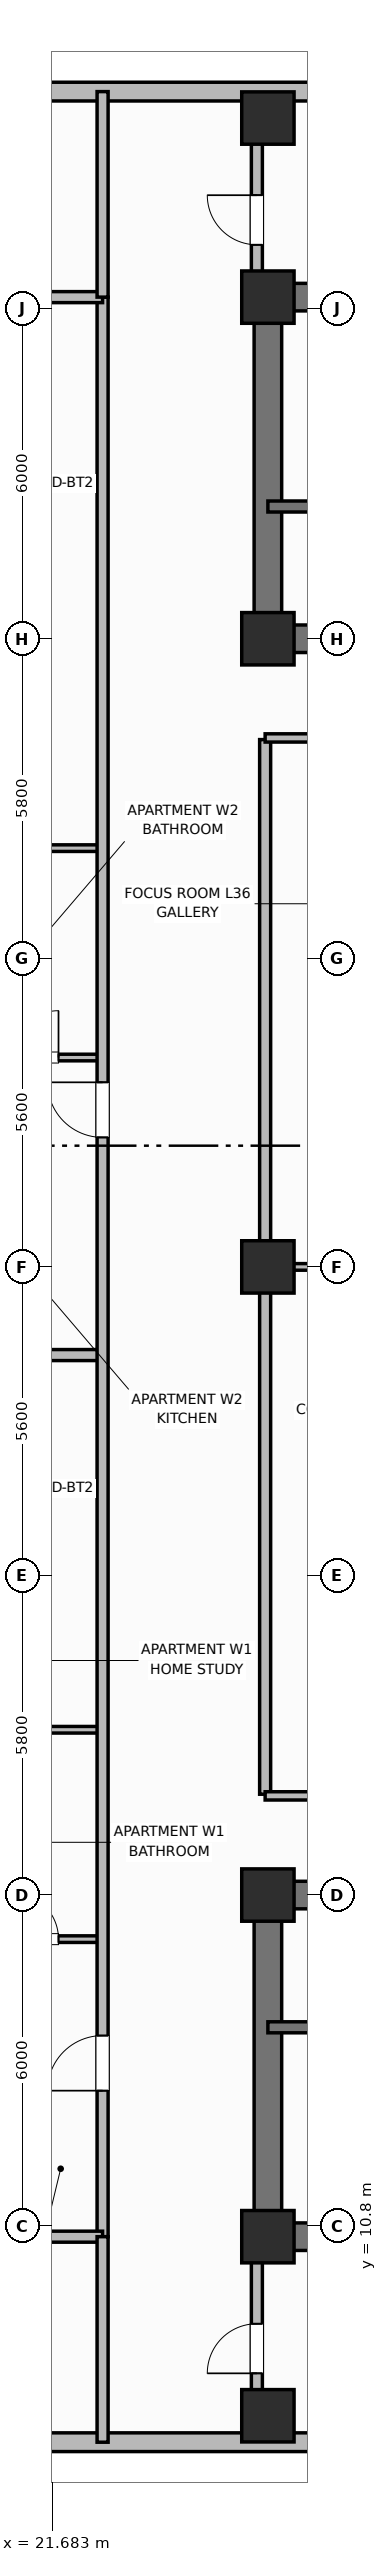
"""IFC4 building model, lengths in metres.
Left out: names, types, materials, properties, quantities, classifications, styles, units other than length and angle.
Written with IfcOpenShell. Run it as: python <this file> out.ifc"""

import sys

from ifc_helpers import new_model, si_unit, direction, frame, frame_2d, origin, origin_2d, place, context, subcontext, project, spatial, rectangle, extrude, element, fill, save


model = new_model("IFC4")
c1 = context("Model", 3, precision=1e-05, world=origin(), true_north=direction((0.0, 1.0)))
c2 = subcontext(c1, "Body", "Model", "MODEL_VIEW")
j1 = project(units=[si_unit("LENGTHUNIT", "METRE"), si_unit("PLANEANGLEUNIT", "RADIAN")], contexts=[c1])
p1 = place(None, origin())
s1 = spatial("IfcSite", under=j1, at=p1, CompositionType="ELEMENT")
p2 = place(p1, origin())
s2 = spatial("IfcBuilding", under=s1, at=p2, CompositionType="ELEMENT")
p3 = place(p2, frame((0.0, 0.0, 147.8)))
s3 = spatial("IfcBuildingStorey", under=s2, at=p3, CompositionType="ELEMENT", Elevation=147.8)
p4 = place(p3, frame((52.8, 10.6, 0.0), z_axis=(0.0, 0.0, 1.0), x_axis=(-1.0, 0.0, 0.0)))
e1 = element("IfcWall", 1, at=p4, inside=s3, PredefinedType="SHEAR", context=c2, shape_type="SweptSolid", body=[
    extrude(rectangle(XDim=27.2, YDim=0.5, at=frame_2d((13.6, 0.0))), origin(), (0.0, 0.0, 1.0), 3.7),
])
p5 = place(p3, frame((25.6, 10.85, 0.0), z_axis=(0.0, 0.0, 1.0), x_axis=(0.0, 1.0, 0.0)))
e2 = element("IfcWall", 2, at=p5, inside=s3, PredefinedType="SHEAR", context=c2, shape_type="SweptSolid", body=[
    extrude(rectangle(XDim=5.7, YDim=0.5, at=frame_2d((2.85, 0.0))), origin(), (0.0, 0.0, 1.0), 3.7),
])
p6 = place(p3, frame((25.6, 16.8, 0.0), z_axis=(0.0, 0.0, 1.0), x_axis=(1.0, 0.0, 0.0)))
e3 = element("IfcWall", 3, at=p6, inside=s3, PredefinedType="SHEAR", context=c2, shape_type="SweptSolid", body=[
    extrude(rectangle(XDim=27.2, YDim=0.5, at=frame_2d((13.6, 0.0))), origin(), (0.0, 0.0, 1.0), 3.7),
])
p7 = place(p6, frame((1.9, 0.0, 0.0)))
e4 = element("IfcOpeningElement", 4, at=p7, cuts=e3, PredefinedType="OPENING", context=c2, shape_type="SweptSolid", body=[
    extrude(rectangle(XDim=1.1, YDim=2.15, at=frame_2d((0.55, 1.075))), frame((0.0, 0.26, 0.0), z_axis=(0.0, -1.0, 0.0), x_axis=(1.0, 0.0, 0.0)), (0.0, 0.0, 1.0), 0.52),
])
p8 = place(p6, frame((13.0, 0.0, 0.0)))
e5 = element("IfcOpeningElement", 5, at=p8, cuts=e3, PredefinedType="OPENING", context=c2, shape_type="SweptSolid", body=[
    extrude(rectangle(XDim=1.2, YDim=2.15, at=frame_2d((0.6, 1.075))), frame((0.0, 0.26, 0.0), z_axis=(0.0, -1.0, 0.0), x_axis=(1.0, 0.0, 0.0)), (0.0, 0.0, 1.0), 0.52),
])
p9 = place(p6, frame((21.6, 0.0, 0.0)))
e6 = element("IfcOpeningElement", 6, at=p9, cuts=e3, PredefinedType="OPENING", context=c2, shape_type="SweptSolid", body=[
    extrude(rectangle(XDim=1.0, YDim=2.15, at=frame_2d((0.5, 1.075))), frame((0.0, 0.26, 0.0), z_axis=(0.0, -1.0, 0.0), x_axis=(1.0, 0.0, 0.0)), (0.0, 0.0, 1.0), 0.52),
])
p10 = place(p3, frame((25.6, 45.8, 0.0), z_axis=(0.0, 0.0, 1.0), x_axis=(1.0, 0.0, 0.0)))
e7 = element("IfcWall", 7, at=p10, inside=s3, PredefinedType="SHEAR", context=c2, shape_type="SweptSolid", body=[
    extrude(rectangle(XDim=27.2, YDim=0.5, at=frame_2d((13.6, 0.0))), origin(), (0.0, 0.0, 1.0), 3.7),
])
p11 = place(p3, frame((25.6, 39.85, 0.0), z_axis=(0.0, 0.0, 1.0), x_axis=(0.0, 1.0, 0.0)))
e8 = element("IfcWall", 8, at=p11, inside=s3, PredefinedType="SHEAR", context=c2, shape_type="SweptSolid", body=[
    extrude(rectangle(XDim=5.7, YDim=0.5, at=frame_2d((2.85, 0.0))), origin(), (0.0, 0.0, 1.0), 3.7),
])
p12 = place(p3, frame((52.8, 39.6, 0.0), z_axis=(0.0, 0.0, 1.0), x_axis=(-1.0, 0.0, 0.0)))
e9 = element("IfcWall", 9, at=p12, inside=s3, PredefinedType="SHEAR", context=c2, shape_type="SweptSolid", body=[
    extrude(rectangle(XDim=27.2, YDim=0.5, at=frame_2d((13.6, 0.0))), origin(), (0.0, 0.0, 1.0), 3.7),
])
p13 = place(p12, frame((24.2, 0.0, 0.0)))
e10 = element("IfcOpeningElement", 10, at=p13, cuts=e9, PredefinedType="OPENING", context=c2, shape_type="SweptSolid", body=[
    extrude(rectangle(XDim=1.1, YDim=2.15, at=frame_2d((0.55, 1.075))), frame((0.0, 0.26, 0.0), z_axis=(0.0, -1.0, 0.0), x_axis=(1.0, 0.0, 0.0)), (0.0, 0.0, 1.0), 0.52),
])
p14 = place(p12, frame((15.1, 0.0, 0.0)))
e11 = element("IfcOpeningElement", 11, at=p14, cuts=e9, PredefinedType="OPENING", context=c2, shape_type="SweptSolid", body=[
    extrude(rectangle(XDim=1.2, YDim=2.15, at=frame_2d((0.6, 1.075))), frame((0.0, 0.26, 0.0), z_axis=(0.0, -1.0, 0.0), x_axis=(1.0, 0.0, 0.0)), (0.0, 0.0, 1.0), 0.52),
])
p15 = place(p12, frame((11.6, 0.0, 0.0)))
e12 = element("IfcOpeningElement", 12, at=p15, cuts=e9, PredefinedType="OPENING", context=c2, shape_type="SweptSolid", body=[
    extrude(rectangle(XDim=0.9, YDim=2.1, at=frame_2d((0.45, 1.05))), frame((0.0, 0.26, 0.0), z_axis=(0.0, -1.0, 0.0), x_axis=(1.0, 0.0, 0.0)), (0.0, 0.0, 1.0), 0.52),
])
p16 = place(p12, frame((3.6, 0.0, 0.0)))
e13 = element("IfcOpeningElement", 13, at=p16, cuts=e9, PredefinedType="OPENING", context=c2, shape_type="SweptSolid", body=[
    extrude(rectangle(XDim=1.0, YDim=2.15, at=frame_2d((0.5, 1.075))), frame((0.0, 0.26, 0.0), z_axis=(0.0, -1.0, 0.0), x_axis=(1.0, 0.0, 0.0)), (0.0, 0.0, 1.0), 0.52),
])
for number, where, z_axis, x_axis in (
    (14, (25.6, 10.6, 0.0), (0.0, 0.0, 1.0), (1.0, 0.0, 0.0)),
    (15, (25.6, 16.8, 0.0), (0.0, 0.0, 1.0), (1.0, 0.0, 0.0)),
    (16, (25.6, 39.6, 0.0), (0.0, 0.0, 1.0), (1.0, 0.0, 0.0)),
    (17, (25.6, 45.8, 0.0), (0.0, 0.0, 1.0), (1.0, 0.0, 0.0)),
    (18, (25.6, 28.2, 0.0), (0.0, 0.0, 1.0), (1.0, 0.0, 0.0)),
    (19, (25.6, 7.35, 0.0), (0.0, 0.0, 1.0), (1.0, 0.0, 0.0)),
    (20, (25.6, 49.05, 0.0), (0.0, 0.0, 1.0), (1.0, 0.0, 0.0)),
):
    element("IfcColumn", number, at=place(p3, frame(where, z_axis=z_axis, x_axis=x_axis)), inside=s3, PredefinedType="COLUMN", context=c2, shape_type="SweptSolid", body=[
        extrude(rectangle(XDim=0.95, YDim=0.95, at=origin_2d()), origin(), (0.0, 0.0, 1.0), 3.7),
    ])
p17 = place(p3, frame((20.2, 6.87, 0.0), z_axis=(0.0, 0.0, 1.0), x_axis=(1.0, 0.0, 0.0)))
e21 = element("IfcWall", 21, at=p17, inside=s3, PredefinedType="SOLIDWALL", context=c2, shape_type="SweptSolid", body=[
    extrude(rectangle(XDim=15.8, YDim=0.34, at=frame_2d((7.9, 0.0))), origin(), (0.0, 0.0, 1.0), 2.72),
])
p18 = place(p17, frame((8.913, 0.0, 0.7)))
e22 = element("IfcOpeningElement", 22, at=p18, cuts=e21, PredefinedType="OPENING", context=c2, shape_type="SweptSolid", body=[
    extrude(rectangle(XDim=1.6, YDim=1.9, at=frame_2d((0.8, 0.95))), frame((0.0, 0.18, 0.0), z_axis=(0.0, -1.0, 0.0), x_axis=(1.0, 0.0, 0.0)), (0.0, 0.0, 1.0), 0.36),
])
p19 = place(p17, frame((11.837, 0.0, 0.7)))
e23 = element("IfcOpeningElement", 23, at=p19, cuts=e21, PredefinedType="OPENING", context=c2, shape_type="SweptSolid", body=[
    extrude(rectangle(XDim=1.6, YDim=1.9, at=frame_2d((0.8, 0.95))), frame((0.0, 0.18, 0.0), z_axis=(0.0, -1.0, 0.0), x_axis=(1.0, 0.0, 0.0)), (0.0, 0.0, 1.0), 0.36),
])
p20 = place(p3, frame((36.0, 49.53, 0.0), z_axis=(0.0, 0.0, 1.0), x_axis=(-1.0, 0.0, 0.0)))
e24 = element("IfcWall", 24, at=p20, inside=s3, PredefinedType="SOLIDWALL", context=c2, shape_type="SweptSolid", body=[
    extrude(rectangle(XDim=15.8, YDim=0.34, at=frame_2d((7.9, 0.0))), origin(), (0.0, 0.0, 1.0), 2.72),
])
p21 = place(p20, frame((5.038, 0.0, 0.7)))
e25 = element("IfcOpeningElement", 25, at=p21, cuts=e24, PredefinedType="OPENING", context=c2, shape_type="SweptSolid", body=[
    extrude(rectangle(XDim=2.1, YDim=1.9, at=frame_2d((1.05, 0.95))), frame((0.0, 0.18, 0.0), z_axis=(0.0, -1.0, 0.0), x_axis=(1.0, 0.0, 0.0)), (0.0, 0.0, 1.0), 0.36),
])
p22 = place(p3, frame((25.6, 14.4, 0.0), z_axis=(0.0, 0.0, 1.0), x_axis=(1.0, 0.0, 0.0)))
e26 = element("IfcWall", 26, at=p22, inside=s3, PredefinedType="SHEAR", context=c2, shape_type="SweptSolid", body=[
    extrude(rectangle(XDim=9.55, YDim=0.2, at=frame_2d((4.775, 0.0))), origin(), (0.0, 0.0, 1.0), 3.7),
])
p23 = place(p22, frame((1.05, 0.0, 0.0)))
e27 = element("IfcOpeningElement", 27, at=p23, cuts=e26, PredefinedType="OPENING", context=c2, shape_type="SweptSolid", body=[
    extrude(rectangle(XDim=1.1, YDim=2.15, at=frame_2d((0.55, 1.075))), frame((0.0, 0.11, 0.0), z_axis=(0.0, -1.0, 0.0), x_axis=(1.0, 0.0, 0.0)), (0.0, 0.0, 1.0), 0.22),
])
p24 = place(p3, frame((35.15, 42.0, 0.0), z_axis=(0.0, 0.0, 1.0), x_axis=(-1.0, 0.0, 0.0)))
e28 = element("IfcWall", 28, at=p24, inside=s3, PredefinedType="SHEAR", context=c2, shape_type="SweptSolid", body=[
    extrude(rectangle(XDim=9.55, YDim=0.2, at=frame_2d((4.775, 0.0))), origin(), (0.0, 0.0, 1.0), 3.7),
])
p25 = place(p24, frame((7.25, 0.0, 0.0)))
e29 = element("IfcOpeningElement", 29, at=p25, cuts=e28, PredefinedType="OPENING", context=c2, shape_type="SweptSolid", body=[
    extrude(rectangle(XDim=1.1, YDim=2.15, at=frame_2d((0.55, 1.075))), frame((0.0, 0.11, 0.0), z_axis=(0.0, -1.0, 0.0), x_axis=(1.0, 0.0, 0.0)), (0.0, 0.0, 1.0), 0.22),
])
p26 = place(p3, frame((25.55, 18.63, 0.0), z_axis=(0.0, 0.0, 1.0), x_axis=(0.0, 1.0, 0.0)))
e30 = element("IfcWall", 30, at=p26, inside=s3, PredefinedType="PARTITIONING", context=c2, shape_type="SweptSolid", body=[
    extrude(rectangle(XDim=19.14, YDim=0.2, at=frame_2d((9.57, 0.0))), origin(), (0.0, 0.0, 1.0), 2.55),
])
for number, where, z_axis, x_axis in (
    (31, (25.55, 18.6, 0.0), (0.0, 0.0, 1.0), (1.0, 0.0, 0.0)),
    (32, (25.55, 37.8, 0.0), (0.0, 0.0, 1.0), (1.0, 0.0, 0.0)),
):
    element("IfcWall", number, at=place(p3, frame(where, z_axis=z_axis, x_axis=x_axis)), inside=s3, PredefinedType="PARTITIONING", context=c2, shape_type="SweptSolid", body=[
        extrude(rectangle(XDim=2.7, YDim=0.15, at=frame_2d((1.35, 0.0))), origin(), (0.0, 0.0, 1.0), 2.55),
    ])
p27 = place(p3, frame((25.6, 28.2, 0.0), z_axis=(0.0, 0.0, 1.0), x_axis=(1.0, 0.0, 0.0)))
e33 = element("IfcWall", 33, at=p27, inside=s3, PredefinedType="PARTITIONING", context=c2, shape_type="SweptSolid", body=[
    extrude(rectangle(XDim=2.66, YDim=0.12, at=frame_2d((1.33, 0.0))), origin(), (0.0, 0.0, 1.0), 2.55),
])
p28 = place(p3, frame((20.35, 16.0, 0.0), z_axis=(0.0, 0.0, 1.0), x_axis=(1.0, 0.0, 0.0)))
e34 = element("IfcWall", 34, at=p28, inside=s3, PredefinedType="PARTITIONING", context=c2, shape_type="SweptSolid", body=[
    extrude(rectangle(XDim=2.25, YDim=0.12, at=frame_2d((1.125, 0.0))), origin(), (0.0, 0.0, 1.0), 2.55),
])
p29 = place(p28, frame((0.6, 0.0, 0.0)))
e35 = element("IfcOpeningElement", 35, at=p29, cuts=e34, PredefinedType="OPENING", context=c2, shape_type="SweptSolid", body=[
    extrude(rectangle(XDim=0.85, YDim=2.1, at=frame_2d((0.425, 1.05))), frame((0.0, 0.07, 0.0), z_axis=(0.0, -1.0, 0.0), x_axis=(1.0, 0.0, 0.0)), (0.0, 0.0, 1.0), 0.14),
])
p30 = place(p3, frame((20.35, 19.8, 0.0), z_axis=(0.0, 0.0, 1.0), x_axis=(1.0, 0.0, 0.0)))
e36 = element("IfcWall", 36, at=p30, inside=s3, PredefinedType="PARTITIONING", context=c2, shape_type="SweptSolid", body=[
    extrude(rectangle(XDim=2.25, YDim=0.12, at=frame_2d((1.125, 0.0))), origin(), (0.0, 0.0, 1.0), 2.55),
])
p31 = place(p3, frame((16.884, 26.6, 0.0), z_axis=(0.0, 0.0, 1.0), x_axis=(1.0, 0.0, 0.0)))
e37 = element("IfcWall", 37, at=p31, inside=s3, PredefinedType="PARTITIONING", context=c2, shape_type="SweptSolid", body=[
    extrude(rectangle(XDim=5.716, YDim=0.2, at=frame_2d((2.858, 0.0))), origin(), (0.0, 0.0, 1.0), 2.55),
])
p32 = place(p3, frame((20.35, 32.0, 0.0), z_axis=(0.0, 0.0, 1.0), x_axis=(1.0, 0.0, 0.0)))
e38 = element("IfcWall", 38, at=p32, inside=s3, PredefinedType="PARTITIONING", context=c2, shape_type="SweptSolid", body=[
    extrude(rectangle(XDim=2.25, YDim=0.12, at=frame_2d((1.125, 0.0))), origin(), (0.0, 0.0, 1.0), 2.55),
])
p33 = place(p32, frame((0.6, 0.0, 0.0)))
e39 = element("IfcOpeningElement", 39, at=p33, cuts=e38, PredefinedType="OPENING", context=c2, shape_type="SweptSolid", body=[
    extrude(rectangle(XDim=0.85, YDim=2.1, at=frame_2d((0.425, 1.05))), frame((0.0, 0.07, 0.0), z_axis=(0.0, -1.0, 0.0), x_axis=(1.0, 0.0, 0.0)), (0.0, 0.0, 1.0), 0.14),
])
p34 = place(p3, frame((20.35, 35.8, 0.0), z_axis=(0.0, 0.0, 1.0), x_axis=(1.0, 0.0, 0.0)))
e40 = element("IfcWall", 40, at=p34, inside=s3, PredefinedType="PARTITIONING", context=c2, shape_type="SweptSolid", body=[
    extrude(rectangle(XDim=2.25, YDim=0.12, at=frame_2d((1.125, 0.0))), origin(), (0.0, 0.0, 1.0), 2.55),
])
p35 = place(p3, frame((22.6, 10.6, 0.0), z_axis=(0.0, 0.0, 1.0), x_axis=(0.0, 1.0, 0.0)))
e41 = element("IfcWall", 41, at=p35, inside=s3, PredefinedType="PARTITIONING", context=c2, shape_type="SweptSolid", body=[
    extrude(rectangle(XDim=35.2, YDim=0.2, at=frame_2d((17.6, 0.0))), origin(), (0.0, 0.0, 1.0), 2.55),
])
p36 = place(p35, frame((2.65, 0.0, 0.0)))
e42 = element("IfcOpeningElement", 42, at=p36, cuts=e41, PredefinedType="OPENING", context=c2, shape_type="SweptSolid", body=[
    extrude(rectangle(XDim=1.0, YDim=2.15, at=frame_2d((0.5, 1.075))), frame((0.0, 0.11, 0.0), z_axis=(0.0, -1.0, 0.0), x_axis=(1.0, 0.0, 0.0)), (0.0, 0.0, 1.0), 0.22),
])
p37 = place(p35, frame((19.95, 0.0, 0.0)))
e43 = element("IfcOpeningElement", 43, at=p37, cuts=e41, PredefinedType="OPENING", context=c2, shape_type="SweptSolid", body=[
    extrude(rectangle(XDim=1.0, YDim=2.15, at=frame_2d((0.5, 1.075))), frame((0.0, 0.11, 0.0), z_axis=(0.0, -1.0, 0.0), x_axis=(1.0, 0.0, 0.0)), (0.0, 0.0, 1.0), 0.22),
])
for number, where, z_axis, x_axis in (
    (44, (16.99, 10.6, 0.0), (0.0, 0.0, 1.0), (1.0, 0.0, 0.0)),
    (45, (16.99, 45.8, 0.0), (0.0, 0.0, 1.0), (1.0, 0.0, 0.0)),
):
    element("IfcWall", number, at=place(p3, frame(where, z_axis=z_axis, x_axis=x_axis)), inside=s3, PredefinedType="PARTITIONING", context=c2, shape_type="SweptSolid", body=[
        extrude(rectangle(XDim=5.61, YDim=0.2, at=frame_2d((2.805, 0.0))), origin(), (0.0, 0.0, 1.0), 2.55),
    ])
for number, where, z_axis, x_axis in (
    (46, (22.6, 6.87, 0.0), (0.0, 0.0, 1.0), (0.0, 1.0, 0.0)),
    (47, (22.6, 45.8, 0.0), (0.0, 0.0, 1.0), (0.0, 1.0, 0.0)),
):
    element("IfcWall", number, at=place(p3, frame(where, z_axis=z_axis, x_axis=x_axis)), inside=s3, PredefinedType="PARTITIONING", context=c2, shape_type="SweptSolid", body=[
        extrude(rectangle(XDim=3.73, YDim=0.2, at=frame_2d((1.865, 0.0))), origin(), (0.0, 0.0, 1.0), 2.55),
    ])
p38 = place(p3, frame((25.4, 7.47, 0.0), z_axis=(0.0, 0.0, 1.0), x_axis=(0.0, 1.0, 0.0)))
e48 = element("IfcWall", 48, at=p38, inside=s3, PredefinedType="PARTITIONING", context=c2, shape_type="SweptSolid", body=[
    extrude(rectangle(XDim=2.83, YDim=0.2, at=frame_2d((1.415, 0.0))), origin(), (0.0, 0.0, 1.0), 2.55),
])
p39 = place(p38, frame((0.65, 0.0, 0.0)))
e49 = element("IfcOpeningElement", 49, at=p39, cuts=e48, PredefinedType="OPENING", context=c2, shape_type="SweptSolid", body=[
    extrude(rectangle(XDim=0.9, YDim=2.1, at=frame_2d((0.45, 1.05))), frame((0.0, 0.11, 0.0), z_axis=(0.0, -1.0, 0.0), x_axis=(1.0, 0.0, 0.0)), (0.0, 0.0, 1.0), 0.22),
])
p40 = place(p3, frame((25.4, 46.1, 0.0), z_axis=(0.0, 0.0, 1.0), x_axis=(0.0, 1.0, 0.0)))
e50 = element("IfcWall", 50, at=p40, inside=s3, PredefinedType="PARTITIONING", context=c2, shape_type="SweptSolid", body=[
    extrude(rectangle(XDim=2.83, YDim=0.2, at=frame_2d((1.415, 0.0))), origin(), (0.0, 0.0, 1.0), 2.55),
])
p41 = place(p40, frame((0.65, 0.0, 0.0)))
e51 = element("IfcOpeningElement", 51, at=p41, cuts=e50, PredefinedType="OPENING", context=c2, shape_type="SweptSolid", body=[
    extrude(rectangle(XDim=0.9, YDim=2.1, at=frame_2d((0.45, 1.05))), frame((0.0, 0.11, 0.0), z_axis=(0.0, -1.0, 0.0), x_axis=(1.0, 0.0, 0.0)), (0.0, 0.0, 1.0), 0.22),
])
p42 = place(p29, origin())
e52 = element("IfcDoor", 52, at=p42, inside=s3, OperationType="SINGLE_SWING_LEFT", PredefinedType="DOOR", context=c2, shape_type="SweptSolid", body=[
    extrude(rectangle(XDim=0.85, YDim=2.1, at=frame_2d((0.425, 1.05))), frame((0.0, 0.025, 0.0), z_axis=(0.0, -1.0, 0.0), x_axis=(1.0, 0.0, 0.0)), (0.0, 0.0, 1.0), 0.05),
])
fill(e35, e52)
p43 = place(p33, origin())
e53 = element("IfcDoor", 53, at=p43, inside=s3, OperationType="SINGLE_SWING_RIGHT", PredefinedType="DOOR", context=c2, shape_type="SweptSolid", body=[
    extrude(rectangle(XDim=0.85, YDim=2.1, at=frame_2d((0.425, 1.05))), frame((0.0, 0.025, 0.0), z_axis=(0.0, -1.0, 0.0), x_axis=(1.0, 0.0, 0.0)), (0.0, 0.0, 1.0), 0.05),
])
fill(e39, e53)
p44 = place(p36, origin())
e54 = element("IfcDoor", 54, at=p44, inside=s3, OperationType="SINGLE_SWING_LEFT", PredefinedType="DOOR", context=c2, shape_type="SweptSolid", body=[
    extrude(rectangle(XDim=1.0, YDim=2.15, at=frame_2d((0.5, 1.075))), frame((0.0, 0.025, 0.0), z_axis=(0.0, -1.0, 0.0), x_axis=(1.0, 0.0, 0.0)), (0.0, 0.0, 1.0), 0.05),
])
fill(e42, e54)
p45 = place(p37, origin())
e55 = element("IfcDoor", 55, at=p45, inside=s3, OperationType="SINGLE_SWING_RIGHT", PredefinedType="DOOR", context=c2, shape_type="SweptSolid", body=[
    extrude(rectangle(XDim=1.0, YDim=2.15, at=frame_2d((0.5, 1.075))), frame((0.0, 0.025, 0.0), z_axis=(0.0, -1.0, 0.0), x_axis=(1.0, 0.0, 0.0)), (0.0, 0.0, 1.0), 0.05),
])
fill(e43, e55)
p46 = place(p39, origin())
e56 = element("IfcDoor", 56, at=p46, inside=s3, OperationType="SINGLE_SWING_LEFT", PredefinedType="DOOR", context=c2, shape_type="SweptSolid", body=[
    extrude(rectangle(XDim=0.9, YDim=2.1, at=frame_2d((0.45, 1.05))), frame((0.0, 0.025, 0.0), z_axis=(0.0, -1.0, 0.0), x_axis=(1.0, 0.0, 0.0)), (0.0, 0.0, 1.0), 0.05),
])
fill(e49, e56)
p47 = place(p41, origin())
e57 = element("IfcDoor", 57, at=p47, inside=s3, OperationType="SINGLE_SWING_RIGHT", PredefinedType="DOOR", context=c2, shape_type="SweptSolid", body=[
    extrude(rectangle(XDim=0.9, YDim=2.1, at=frame_2d((0.45, 1.05))), frame((0.0, 0.025, 0.0), z_axis=(0.0, -1.0, 0.0), x_axis=(1.0, 0.0, 0.0)), (0.0, 0.0, 1.0), 0.05),
])
fill(e51, e57)
save(model, sys.argv[1])
